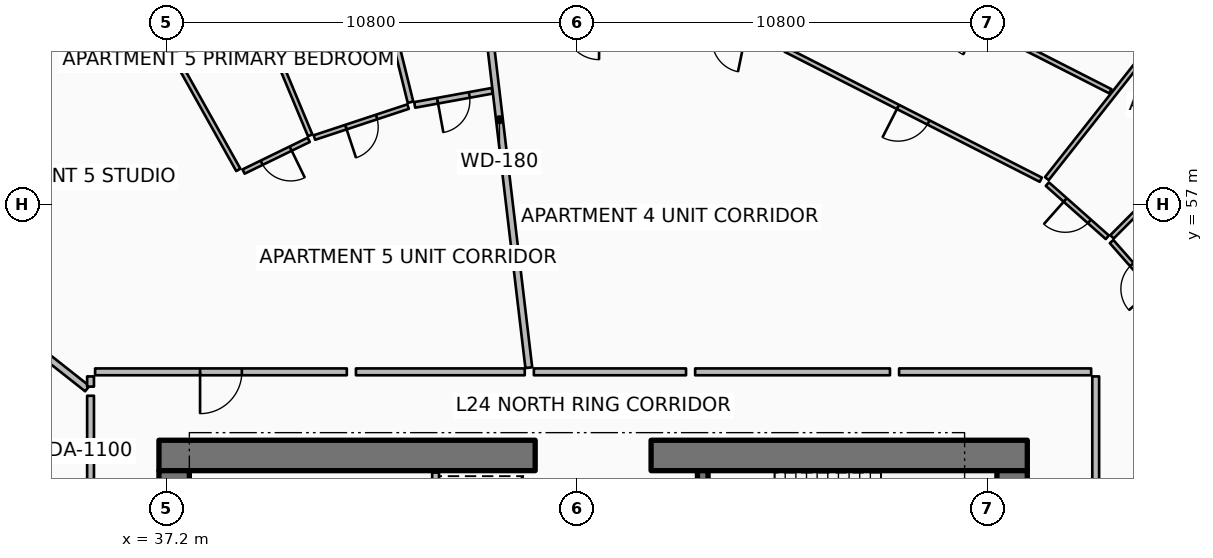
"""IFC4 building model, lengths in metres.
Left out: names, types, materials, properties, quantities, classifications, styles, units other than length and angle.
Written with IfcOpenShell. Run it as: python <this file> out.ifc"""

import sys

from ifc_helpers import new_model, si_unit, direction, frame, frame_2d, origin, origin_2d, place, context, subcontext, project, spatial, rectangle, circle, extrude, element, fill, save


model = new_model("IFC4")
c1 = context("Model", 3, precision=1e-05, world=origin(), true_north=direction((0.0, 1.0)))
c2 = subcontext(c1, "Body", "Model", "MODEL_VIEW")
j1 = project(units=[si_unit("LENGTHUNIT", "METRE"), si_unit("PLANEANGLEUNIT", "RADIAN")], contexts=[c1])
p1 = place(None, origin())
s1 = spatial("IfcSite", under=j1, at=p1, CompositionType="ELEMENT")
p2 = place(p1, origin())
s2 = spatial("IfcBuilding", under=s1, at=p2, CompositionType="ELEMENT")
p3 = place(p2, frame((0.0, 0.0, 97.65)))
s3 = spatial("IfcBuildingStorey", under=s2, at=p3, CompositionType="ELEMENT", Elevation=97.65)
p4 = place(p3, frame((37.0, 50.4, 0.0), z_axis=(0.0, 0.0, 1.0), x_axis=(1.0, 0.0, 0.0)))
e1 = element("IfcWall", 1, at=p4, inside=s3, PredefinedType="SHEAR", context=c2, shape_type="SweptSolid", body=[
    extrude(rectangle(XDim=9.9, YDim=0.8, at=frame_2d((4.95, 0.0))), origin(), (0.0, 0.0, 1.0), 3.75),
])
p5 = place(p3, frame((49.95, 50.4, 0.0), z_axis=(0.0, 0.0, 1.0), x_axis=(1.0, 0.0, 0.0)))
e2 = element("IfcWall", 2, at=p5, inside=s3, PredefinedType="SHEAR", context=c2, shape_type="SweptSolid", body=[
    extrude(rectangle(XDim=9.9, YDim=0.8, at=frame_2d((4.95, 0.0))), origin(), (0.0, 0.0, 1.0), 3.75),
])
for number, where, z_axis, x_axis in (
    (3, (37.4, 34.0, 0.0), (0.0, 0.0, 1.0), (0.0, 1.0, 0.0)),
    (4, (59.45, 34.0, 0.0), (0.0, 0.0, 1.0), (0.0, 1.0, 0.0)),
):
    element("IfcWall", number, at=place(p3, frame(where, z_axis=z_axis, x_axis=x_axis)), inside=s3, PredefinedType="SHEAR", context=c2, shape_type="SweptSolid", body=[
        extrude(rectangle(XDim=16.0, YDim=0.8, at=frame_2d((8.0, 0.0))), origin(), (0.0, 0.0, 1.0), 3.75),
    ])
p6 = place(p3, frame((51.31, 46.5, 0.0), z_axis=(0.0, 0.0, 1.0), x_axis=(0.0, 1.0, 0.0)))
e5 = element("IfcWall", 5, at=p6, inside=s3, PredefinedType="SHEAR", context=c2, shape_type="SweptSolid", body=[
    extrude(rectangle(XDim=3.5, YDim=0.28, at=frame_2d((1.75, 0.0))), origin(), (0.0, 0.0, 1.0), 3.75),
])
p7 = place(p3, frame((37.24, 61.214, 0.0), z_axis=(0.0, 0.0, 1.0), x_axis=(1.0, 0.0, 0.0)))
e6 = element("IfcColumn", 6, at=p7, inside=s3, PredefinedType="COLUMN", context=c2, shape_type="SweptSolid", body=[
    extrude(circle(Radius=0.6, at=origin_2d()), origin(), (0.0, 0.0, 1.0), 3.5),
])
p8 = place(p3, frame((44.28, 47.82, 0.0), z_axis=(0.0, 0.0, 1.0), x_axis=(0.0, 1.0, 0.0)))
e7 = element("IfcWall", 7, at=p8, inside=s3, PredefinedType="PARTITIONING", context=c2, shape_type="SweptSolid", body=[
    extrude(rectangle(XDim=2.13, YDim=0.18, at=frame_2d((1.065, 0.0))), origin(), (0.0, 0.0, 1.0), 3.5),
])
p9 = place(p3, frame((46.732, 52.709, 0.0), z_axis=(0.0, 0.0, 1.0), x_axis=(-0.117532311618, 0.993069058891, 0.0)))
e8 = element("IfcWall", 8, at=p9, inside=s3, PredefinedType="PARTITIONING", context=c2, shape_type="SweptSolid", body=[
    extrude(rectangle(XDim=13.138, YDim=0.18, at=frame_2d((6.569, 0.0))), origin(), (0.0, 0.0, 1.0), 2.94),
])
p10 = place(p3, frame((35.114, 52.159, 0.0), z_axis=(0.0, 0.0, 1.0), x_axis=(-0.785295873565, 0.619120659453, 0.0)))
e9 = element("IfcWall", 9, at=p10, inside=s3, PredefinedType="PARTITIONING", context=c2, shape_type="SweptSolid", body=[
    extrude(rectangle(XDim=9.829, YDim=0.18, at=frame_2d((4.915, 0.0))), origin(), (0.0, 0.0, 1.0), 2.94),
])
p11 = place(p3, frame((35.2, 51.971, 0.0), z_axis=(0.0, 0.0, 1.0), x_axis=(0.0, -1.0, 0.0)))
e10 = element("IfcWall", 10, at=p11, inside=s3, PredefinedType="PARTITIONING", context=c2, shape_type="SweptSolid", body=[
    extrude(rectangle(XDim=6.241, YDim=0.18, at=frame_2d((3.12, 0.0))), origin(), (0.0, 0.0, 1.0), 2.94),
])
p12 = place(p11, frame((2.57, 0.0, 0.0)))
e11 = element("IfcOpeningElement", 11, at=p12, cuts=e10, PredefinedType="OPENING", context=c2, shape_type="SweptSolid", body=[
    extrude(rectangle(XDim=1.1, YDim=2.1, at=frame_2d((0.55, 1.05))), frame((0.0, 0.1, 0.0), z_axis=(0.0, -1.0, 0.0), x_axis=(1.0, 0.0, 0.0)), (0.0, 0.0, 1.0), 0.2),
])
p13 = place(p3, frame((61.65, 49.764, 0.0), z_axis=(0.0, 0.0, 1.0), x_axis=(0.0, 1.0, 0.0)))
e12 = element("IfcWall", 12, at=p13, inside=s3, PredefinedType="PARTITIONING", context=c2, shape_type="SweptSolid", body=[
    extrude(rectangle(XDim=2.716, YDim=0.18, at=frame_2d((1.358, 0.0))), origin(), (0.0, 0.0, 1.0), 2.94),
])
p14 = place(p3, frame((61.53, 52.6, 0.0), z_axis=(0.0, 0.0, 1.0), x_axis=(-1.0, 0.0, 0.0)))
e13 = element("IfcWall", 13, at=p14, inside=s3, PredefinedType="PARTITIONING", context=c2, shape_type="SweptSolid", body=[
    extrude(rectangle(XDim=5.054, YDim=0.18, at=frame_2d((2.527, 0.0))), origin(), (0.0, 0.0, 1.0), 2.94),
])
p15 = place(p3, frame((62.079, 56.152, 0.0), z_axis=(0.0, 0.0, 1.0), x_axis=(0.705264029557, 0.70894474299, 0.0)))
e14 = element("IfcWall", 14, at=p15, inside=s3, PredefinedType="PARTITIONING", context=c2, shape_type="SweptSolid", body=[
    extrude(rectangle(XDim=8.689, YDim=0.125, at=frame_2d((4.345, 0.0))), origin(), (0.0, 0.0, 1.0), 2.94),
])
p16 = place(p3, frame((63.695, 54.179, 0.0), z_axis=(0.0, 0.0, 1.0), x_axis=(-0.660607779432, 0.750731218049, 0.0)))
e15 = element("IfcWall", 15, at=p16, inside=s3, PredefinedType="PARTITIONING", context=c2, shape_type="SweptSolid", body=[
    extrude(rectangle(XDim=2.462, YDim=0.125, at=frame_2d((1.231, 0.0))), origin(), (0.0, 0.0, 1.0), 2.94),
])
p17 = place(p16, frame((0.806, 0.0, 0.0)))
e16 = element("IfcOpeningElement", 16, at=p17, cuts=e15, PredefinedType="OPENING", context=c2, shape_type="SweptSolid", body=[
    extrude(rectangle(XDim=0.85, YDim=2.06, at=frame_2d((0.425, 1.03))), frame((0.0, 0.073, 0.0), z_axis=(0.0, -1.0, 0.0), x_axis=(1.0, 0.0, 0.0)), (0.0, 0.0, 1.0), 0.145),
])
p18 = place(p3, frame((61.955, 56.141, 0.0), z_axis=(0.0, 0.0, 1.0), x_axis=(-0.748379596579, 0.663270668297, 0.0)))
e17 = element("IfcWall", 17, at=p18, inside=s3, PredefinedType="PARTITIONING", context=c2, shape_type="SweptSolid", body=[
    extrude(rectangle(XDim=2.108, YDim=0.125, at=frame_2d((1.054, 0.0))), origin(), (0.0, 0.0, 1.0), 2.94),
])
p19 = place(p18, frame((0.629, 0.0, 0.0)))
e18 = element("IfcOpeningElement", 18, at=p19, cuts=e17, PredefinedType="OPENING", context=c2, shape_type="SweptSolid", body=[
    extrude(rectangle(XDim=0.85, YDim=2.06, at=frame_2d((0.425, 1.03))), frame((0.0, 0.073, 0.0), z_axis=(0.0, -1.0, 0.0), x_axis=(1.0, 0.0, 0.0)), (0.0, 0.0, 1.0), 0.145),
])
p20 = place(p3, frame((56.236, 52.6, 0.0), z_axis=(0.0, 0.0, 1.0), x_axis=(-1.0, 0.0, 0.0)))
e19 = element("IfcWall", 19, at=p20, inside=s3, PredefinedType="PARTITIONING", context=c2, shape_type="SweptSolid", body=[
    extrude(rectangle(XDim=5.127, YDim=0.18, at=frame_2d((2.563, 0.0))), origin(), (0.0, 0.0, 1.0), 2.94),
])
p21 = place(p3, frame((60.365, 57.684, 0.0), z_axis=(0.0, 0.0, 1.0), x_axis=(0.619089966413, 0.785320070727, 0.0)))
e20 = element("IfcWall", 20, at=p21, inside=s3, PredefinedType="PARTITIONING", context=c2, shape_type="SweptSolid", body=[
    extrude(rectangle(XDim=8.699, YDim=0.125, at=frame_2d((4.35, 0.0))), origin(), (0.0, 0.0, 1.0), 2.94),
])
p22 = place(p3, frame((60.205, 57.656, 0.0), z_axis=(0.0, 0.0, 1.0), x_axis=(-0.891005117697, 0.453993260123, 0.0)))
e21 = element("IfcWall", 21, at=p22, inside=s3, PredefinedType="PARTITIONING", context=c2, shape_type="SweptSolid", body=[
    extrude(rectangle(XDim=7.533, YDim=0.125, at=frame_2d((3.767, 0.0))), origin(), (0.0, 0.0, 1.0), 2.94),
])
p23 = place(p22, frame((3.317, 0.0, 0.0)))
e22 = element("IfcOpeningElement", 22, at=p23, cuts=e21, PredefinedType="OPENING", context=c2, shape_type="SweptSolid", body=[
    extrude(rectangle(XDim=0.9, YDim=2.08, at=frame_2d((0.45, 1.04))), frame((0.0, 0.073, 0.0), z_axis=(0.0, -1.0, 0.0), x_axis=(1.0, 0.0, 0.0)), (0.0, 0.0, 1.0), 0.145),
])
p24 = place(p3, frame((62.038, 59.981, 0.0), z_axis=(0.0, 0.0, 1.0), x_axis=(-0.891001540604, 0.454000280442, 0.0)))
e23 = element("IfcWall", 23, at=p24, inside=s3, PredefinedType="PARTITIONING", context=c2, shape_type="SweptSolid", body=[
    extrude(rectangle(XDim=8.689, YDim=0.125, at=frame_2d((4.344, 0.0))), origin(), (0.0, 0.0, 1.0), 2.94),
])
p25 = place(p24, frame((3.895, 0.0, 0.0)))
e24 = element("IfcOpeningElement", 24, at=p25, cuts=e23, PredefinedType="OPENING", context=c2, shape_type="SweptSolid", body=[
    extrude(rectangle(XDim=0.9, YDim=2.08, at=frame_2d((0.45, 1.04))), frame((0.0, 0.073, 0.0), z_axis=(0.0, -1.0, 0.0), x_axis=(1.0, 0.0, 0.0)), (0.0, 0.0, 1.0), 0.145),
])
p26 = place(p3, frame((50.869, 52.6, 0.0), z_axis=(0.0, 0.0, 1.0), x_axis=(-1.0, 0.0, 0.0)))
e25 = element("IfcWall", 25, at=p26, inside=s3, PredefinedType="PARTITIONING", context=c2, shape_type="SweptSolid", body=[
    extrude(rectangle(XDim=4.004, YDim=0.18, at=frame_2d((2.002, 0.0))), origin(), (0.0, 0.0, 1.0), 2.94),
])
p27 = place(p3, frame((41.944, 52.6, 0.0), z_axis=(0.0, 0.0, 1.0), x_axis=(-1.0, 0.0, 0.0)))
e26 = element("IfcWall", 26, at=p27, inside=s3, PredefinedType="PARTITIONING", context=c2, shape_type="SweptSolid", body=[
    extrude(rectangle(XDim=6.624, YDim=0.18, at=frame_2d((3.312, 0.0))), origin(), (0.0, 0.0, 1.0), 2.94),
])
p28 = place(p27, frame((2.762, 0.0, 0.0)))
e27 = element("IfcOpeningElement", 27, at=p28, cuts=e26, PredefinedType="OPENING", context=c2, shape_type="SweptSolid", body=[
    extrude(rectangle(XDim=1.1, YDim=2.1, at=frame_2d((0.55, 1.05))), frame((0.0, 0.1, 0.0), z_axis=(0.0, -1.0, 0.0), x_axis=(1.0, 0.0, 0.0)), (0.0, 0.0, 1.0), 0.2),
])
p29 = place(p3, frame((35.2, 52.48, 0.0), z_axis=(0.0, 0.0, 1.0), x_axis=(0.0, -1.0, 0.0)))
e28 = element("IfcWall", 28, at=p29, inside=s3, PredefinedType="PARTITIONING", context=c2, shape_type="SweptSolid", body=[
    extrude(rectangle(XDim=0.269, YDim=0.18, at=frame_2d((0.135, 0.0))), origin(), (0.0, 0.0, 1.0), 2.94),
])
p30 = place(p3, frame((46.625, 52.6, 0.0), z_axis=(0.0, 0.0, 1.0), x_axis=(-1.0, 0.0, 0.0)))
e29 = element("IfcWall", 29, at=p30, inside=s3, PredefinedType="PARTITIONING", context=c2, shape_type="SweptSolid", body=[
    extrude(rectangle(XDim=4.442, YDim=0.18, at=frame_2d((2.221, 0.0))), origin(), (0.0, 0.0, 1.0), 2.94),
])
p31 = place(p3, frame((39.088, 57.913, 0.0), z_axis=(0.0, 0.0, 1.0), x_axis=(-0.488595379978, 0.872510489716, 0.0)))
e30 = element("IfcWall", 30, at=p31, inside=s3, PredefinedType="PARTITIONING", context=c2, shape_type="SweptSolid", body=[
    extrude(rectangle(XDim=5.583, YDim=0.125, at=frame_2d((2.792, 0.0))), origin(), (0.0, 0.0, 1.0), 2.94),
])
p32 = place(p3, frame((45.77, 59.995, 0.0), z_axis=(0.0, 0.0, 1.0), x_axis=(-0.983792584323, -0.179310208943, 0.0)))
e31 = element("IfcWall", 31, at=p32, inside=s3, PredefinedType="PARTITIONING", context=c2, shape_type="SweptSolid", body=[
    extrude(rectangle(XDim=2.074, YDim=0.15, at=frame_2d((1.037, 0.0))), origin(), (0.0, 0.0, 1.0), 2.94),
])
p33 = place(p32, frame((0.612, 0.0, 0.0)))
e32 = element("IfcOpeningElement", 32, at=p33, cuts=e31, PredefinedType="OPENING", context=c2, shape_type="SweptSolid", body=[
    extrude(rectangle(XDim=0.85, YDim=2.06, at=frame_2d((0.425, 1.03))), frame((0.0, 0.085, 0.0), z_axis=(0.0, -1.0, 0.0), x_axis=(1.0, 0.0, 0.0)), (0.0, 0.0, 1.0), 0.17),
])
p34 = place(p3, frame((43.619, 59.695, 0.0), z_axis=(0.0, 0.0, 1.0), x_axis=(-0.240311723112, 0.970695768887, 0.0)))
e33 = element("IfcWall", 33, at=p34, inside=s3, PredefinedType="PARTITIONING", context=c2, shape_type="SweptSolid", body=[
    extrude(rectangle(XDim=5.193, YDim=0.15, at=frame_2d((2.597, 0.0))), origin(), (0.0, 0.0, 1.0), 2.94),
])
p35 = place(p3, frame((40.979, 58.823, 0.0), z_axis=(0.0, 0.0, 1.0), x_axis=(-0.385130983934, 0.92286192099, 0.0)))
e34 = element("IfcWall", 34, at=p35, inside=s3, PredefinedType="PARTITIONING", context=c2, shape_type="SweptSolid", body=[
    extrude(rectangle(XDim=5.211, YDim=0.125, at=frame_2d((2.605, 0.0))), origin(), (0.0, 0.0, 1.0), 2.94),
])
p36 = place(p3, frame((43.555, 59.579, 0.0), z_axis=(0.0, 0.0, 1.0), x_axis=(-0.949554185533, -0.313603011364, 0.0)))
e35 = element("IfcWall", 35, at=p36, inside=s3, PredefinedType="PARTITIONING", context=c2, shape_type="SweptSolid", body=[
    extrude(rectangle(XDim=2.596, YDim=0.125, at=frame_2d((1.298, 0.0))), origin(), (0.0, 0.0, 1.0), 2.94),
])
p37 = place(p36, frame((0.873, 0.0, 0.0)))
e36 = element("IfcOpeningElement", 36, at=p37, cuts=e35, PredefinedType="OPENING", context=c2, shape_type="SweptSolid", body=[
    extrude(rectangle(XDim=0.85, YDim=2.06, at=frame_2d((0.425, 1.03))), frame((0.0, 0.073, 0.0), z_axis=(0.0, -1.0, 0.0), x_axis=(1.0, 0.0, 0.0)), (0.0, 0.0, 1.0), 0.145),
])
p38 = place(p3, frame((40.942, 58.705, 0.0), z_axis=(0.0, 0.0, 1.0), x_axis=(-0.899211958503, -0.437513261153, 0.0)))
e37 = element("IfcWall", 37, at=p38, inside=s3, PredefinedType="PARTITIONING", context=c2, shape_type="SweptSolid", body=[
    extrude(rectangle(XDim=1.908, YDim=0.125, at=frame_2d((0.954, 0.0))), origin(), (0.0, 0.0, 1.0), 2.94),
])
p39 = place(p38, frame((0.529, 0.0, 0.0)))
e38 = element("IfcOpeningElement", 38, at=p39, cuts=e37, PredefinedType="OPENING", context=c2, shape_type="SweptSolid", body=[
    extrude(rectangle(XDim=0.85, YDim=2.06, at=frame_2d((0.425, 1.03))), frame((0.0, 0.073, 0.0), z_axis=(0.0, -1.0, 0.0), x_axis=(1.0, 0.0, 0.0)), (0.0, 0.0, 1.0), 0.145),
])
p40 = place(p17, origin())
e39 = element("IfcDoor", 39, at=p40, inside=s3, OperationType="SINGLE_SWING_LEFT", PredefinedType="DOOR", context=c2, shape_type="SweptSolid", body=[
    extrude(rectangle(XDim=0.85, YDim=2.06, at=frame_2d((0.425, 1.03))), frame((0.0, 0.025, 0.0), z_axis=(0.0, -1.0, 0.0), x_axis=(1.0, 0.0, 0.0)), (0.0, 0.0, 1.0), 0.05),
])
fill(e16, e39)
p41 = place(p19, origin())
e40 = element("IfcDoor", 40, at=p41, inside=s3, OperationType="SINGLE_SWING_RIGHT", PredefinedType="DOOR", context=c2, shape_type="SweptSolid", body=[
    extrude(rectangle(XDim=0.85, YDim=2.06, at=frame_2d((0.425, 1.03))), frame((0.0, 0.025, 0.0), z_axis=(0.0, -1.0, 0.0), x_axis=(1.0, 0.0, 0.0)), (0.0, 0.0, 1.0), 0.05),
])
fill(e18, e40)
p42 = place(p23, origin())
e41 = element("IfcDoor", 41, at=p42, inside=s3, OperationType="SINGLE_SWING_RIGHT", PredefinedType="DOOR", context=c2, shape_type="SweptSolid", body=[
    extrude(rectangle(XDim=0.9, YDim=2.08, at=frame_2d((0.45, 1.04))), frame((0.0, 0.025, 0.0), z_axis=(0.0, -1.0, 0.0), x_axis=(1.0, 0.0, 0.0)), (0.0, 0.0, 1.0), 0.05),
])
fill(e22, e41)
p43 = place(p28, origin())
e42 = element("IfcDoor", 42, at=p43, inside=s3, OperationType="SINGLE_SWING_RIGHT", PredefinedType="DOOR", context=c2, shape_type="SweptSolid", body=[
    extrude(rectangle(XDim=1.1, YDim=2.1, at=frame_2d((0.55, 1.05))), frame((0.0, 0.025, 0.0), z_axis=(0.0, -1.0, 0.0), x_axis=(1.0, 0.0, 0.0)), (0.0, 0.0, 1.0), 0.05),
])
fill(e27, e42)
p44 = place(p33, origin())
e43 = element("IfcDoor", 43, at=p44, inside=s3, OperationType="SINGLE_SWING_RIGHT", PredefinedType="DOOR", context=c2, shape_type="SweptSolid", body=[
    extrude(rectangle(XDim=0.85, YDim=2.06, at=frame_2d((0.425, 1.03))), frame((0.0, 0.025, 0.0), z_axis=(0.0, -1.0, 0.0), x_axis=(1.0, 0.0, 0.0)), (0.0, 0.0, 1.0), 0.05),
])
fill(e32, e43)
p45 = place(p37, origin())
e44 = element("IfcDoor", 44, at=p45, inside=s3, OperationType="SINGLE_SWING_RIGHT", PredefinedType="DOOR", context=c2, shape_type="SweptSolid", body=[
    extrude(rectangle(XDim=0.85, YDim=2.06, at=frame_2d((0.425, 1.03))), frame((0.0, 0.025, 0.0), z_axis=(0.0, -1.0, 0.0), x_axis=(1.0, 0.0, 0.0)), (0.0, 0.0, 1.0), 0.05),
])
fill(e36, e44)
p46 = place(p39, origin())
e45 = element("IfcDoor", 45, at=p46, inside=s3, OperationType="SINGLE_SWING_LEFT", PredefinedType="DOOR", context=c2, shape_type="SweptSolid", body=[
    extrude(rectangle(XDim=0.85, YDim=2.06, at=frame_2d((0.425, 1.03))), frame((0.0, 0.025, 0.0), z_axis=(0.0, -1.0, 0.0), x_axis=(1.0, 0.0, 0.0)), (0.0, 0.0, 1.0), 0.05),
])
fill(e38, e45)
save(model, sys.argv[1])
